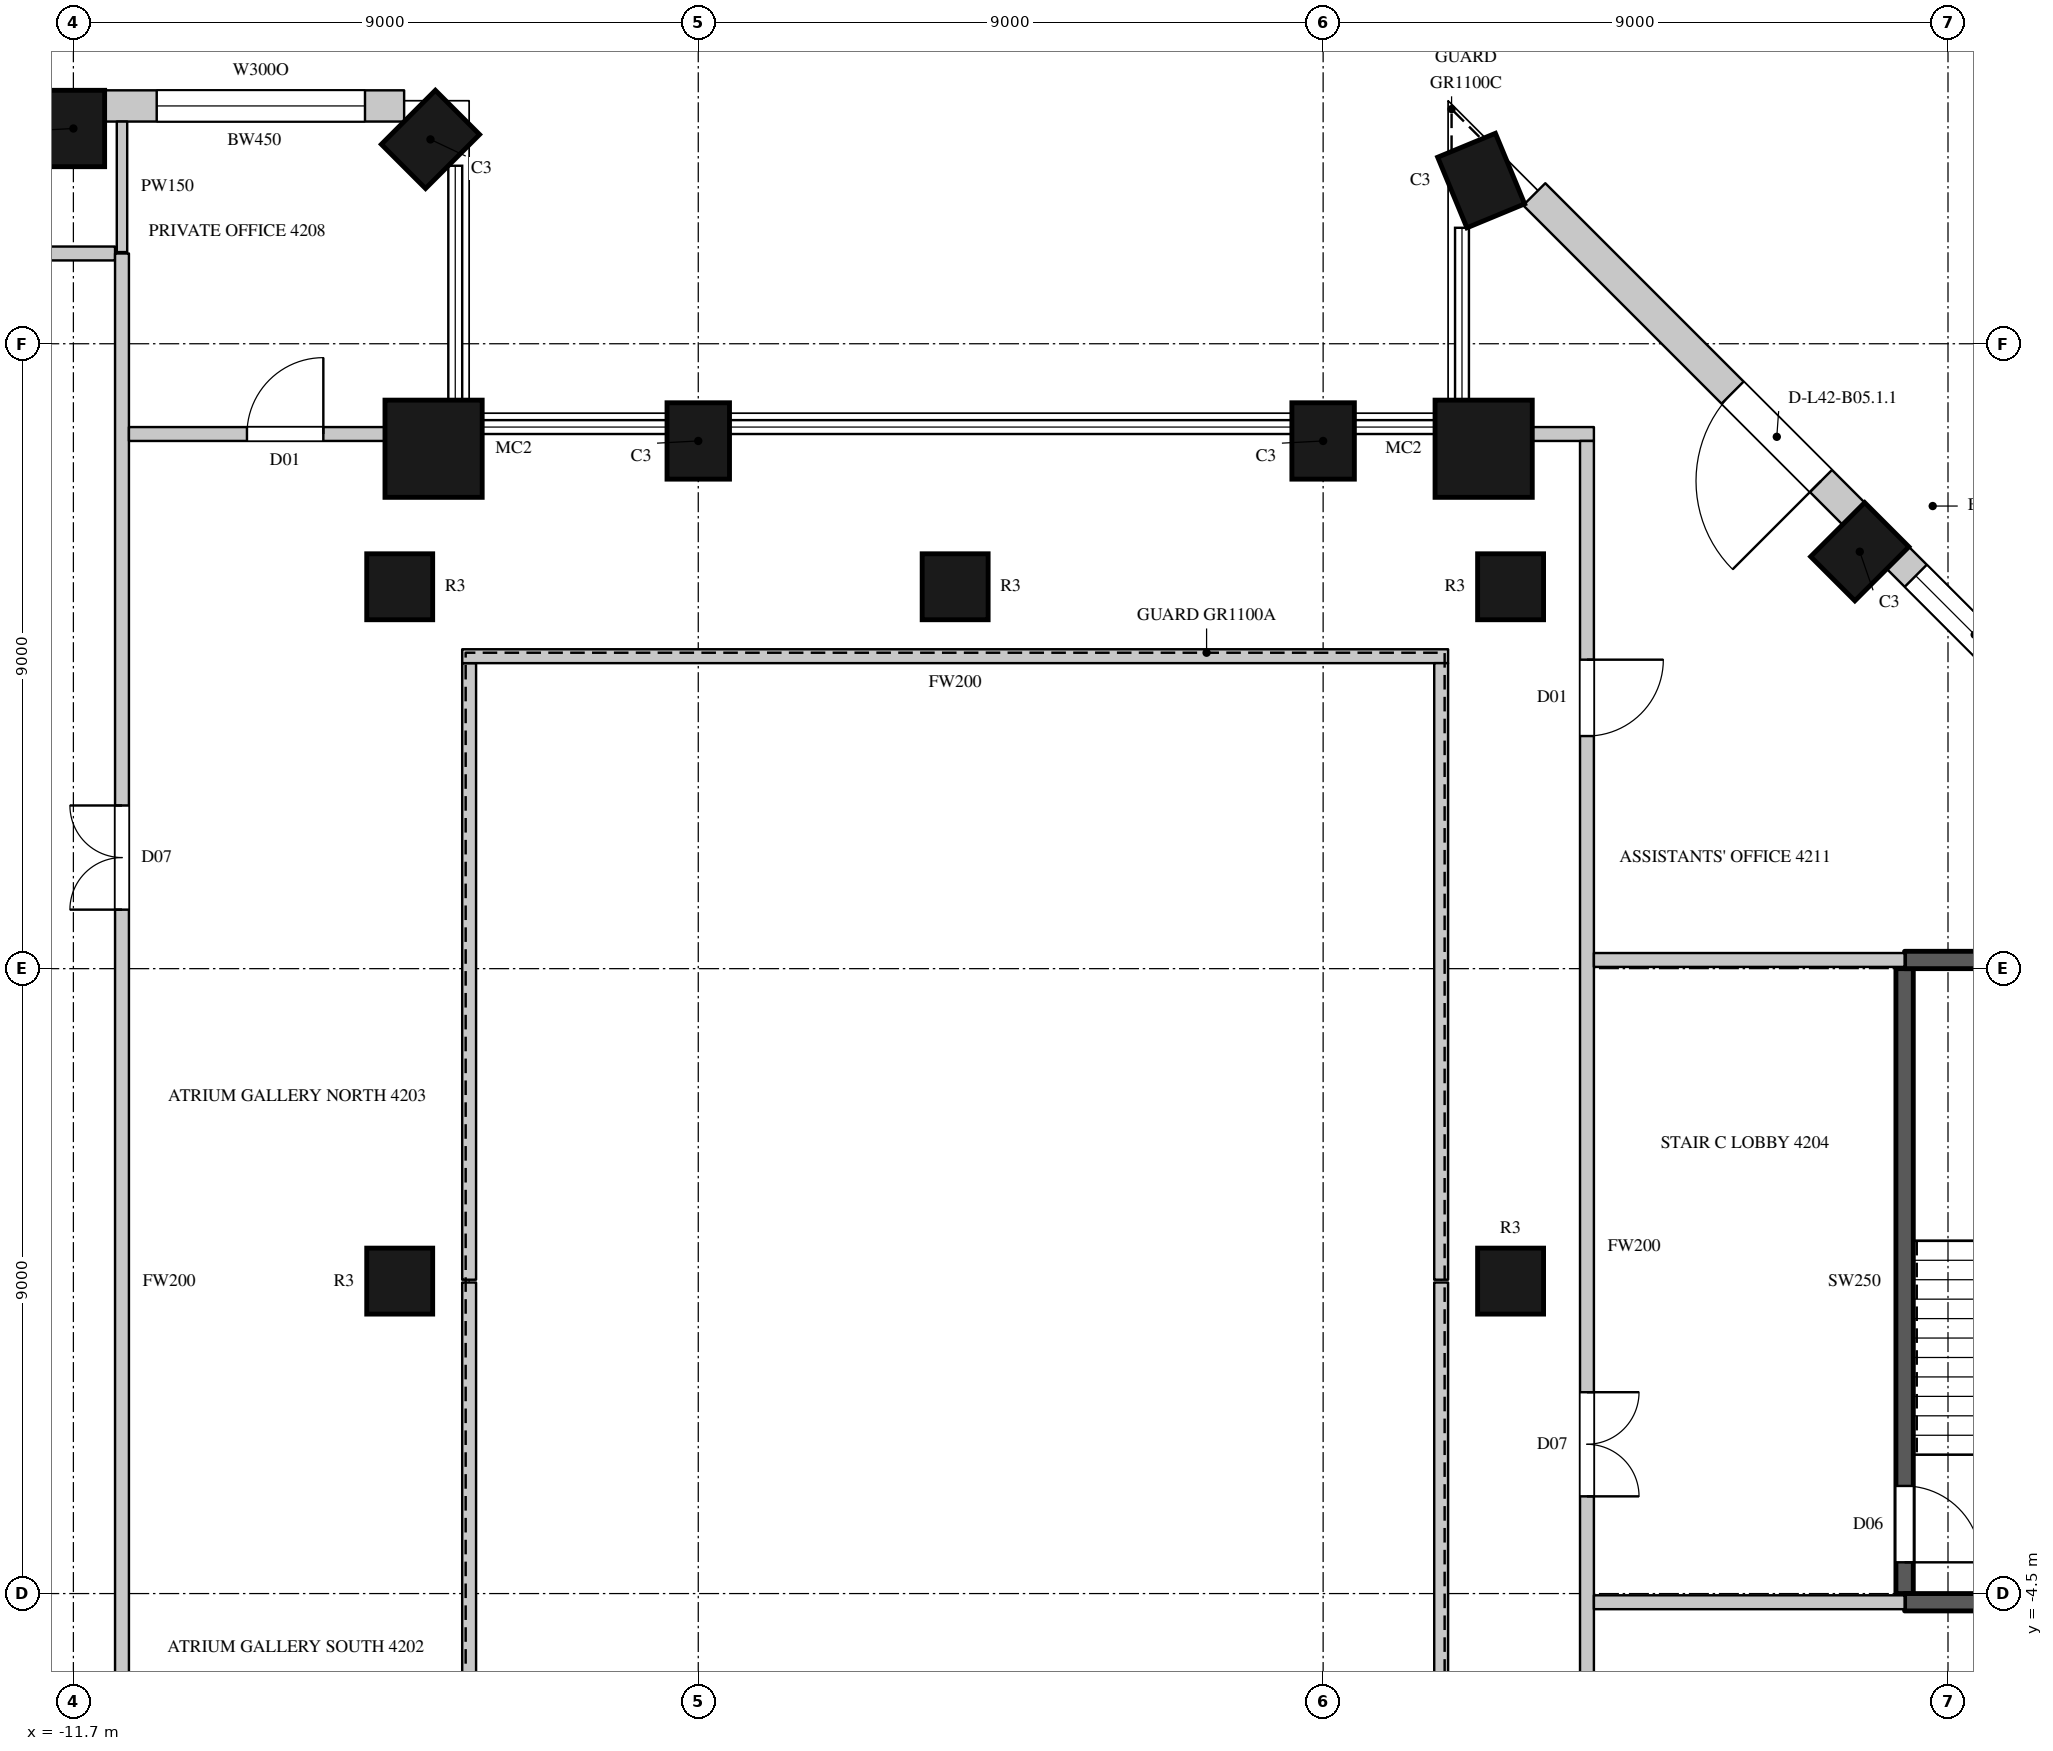
"""IFC4 building model, lengths in metres.
Left out: names, types, materials, properties, quantities, classifications, styles, units other than length and angle.
Written with IfcOpenShell. Run it as: python <this file> out.ifc"""

import sys

from ifc_helpers import new_model, si_unit, direction, frame, frame_2d, origin, origin_2d, place, context, subcontext, project, spatial, rectangle, circle, extrude, element, fill, save


model = new_model("IFC4")
c1 = context("Model", 3, precision=1e-05, world=origin(), true_north=direction((0.0, 1.0)))
c2 = subcontext(c1, "Body", "Model", "MODEL_VIEW")
j1 = project(units=[si_unit("LENGTHUNIT", "METRE"), si_unit("PLANEANGLEUNIT", "RADIAN")], contexts=[c1])
p1 = place(None, origin())
s1 = spatial("IfcSite", under=j1, at=p1, CompositionType="ELEMENT")
p2 = place(p1, origin())
s2 = spatial("IfcBuilding", under=s1, at=p2, CompositionType="ELEMENT")
p3 = place(p2, frame((0.0, 0.0, 193.3)))
s3 = spatial("IfcBuildingStorey", under=s2, at=p3, CompositionType="ELEMENT", Elevation=193.3)
for number, where, z_axis, x_axis in (
    (1, (14.029, 10.505, 0.0), (0.0, 0.0, 1.0), (-0.707, 0.707, 0.0)),
    (2, (8.576, 15.85, 0.0), (0.0, 0.0, 1.0), (-0.924, -0.383, 0.0)),
):
    element("IfcColumn", number, at=place(p3, frame(where, z_axis=z_axis, x_axis=x_axis)), inside=s3, PredefinedType="COLUMN", context=c2, shape_type="SweptSolid", body=[
        extrude(rectangle(XDim=0.9, YDim=1.1, at=origin_2d()), origin(), (0.0, 0.0, 1.0), 4.1),
    ])
p4 = place(p3, frame((8.612, 11.988, 0.0), z_axis=(0.0, 0.0, 1.0), x_axis=(1.0, 0.0, 0.0)))
e3 = element("IfcColumn", 3, at=p4, inside=s3, PredefinedType="COLUMN", context=c2, shape_type="SweptSolid", body=[
    extrude(circle(Radius=0.7, at=origin_2d()), origin(), (0.0, 0.0, 1.0), 4.1),
])
for number, where, z_axis, x_axis in (
    (4, (6.3, 12.1, 0.0), (0.0, 0.0, 1.0), (-1.0, 0.0, 0.0)),
    (5, (-2.7, 12.1, 0.0), (0.0, 0.0, 1.0), (-1.0, 0.0, 0.0)),
):
    element("IfcColumn", number, at=place(p3, frame(where, z_axis=z_axis, x_axis=x_axis)), inside=s3, PredefinedType="COLUMN", context=c2, shape_type="SweptSolid", body=[
        extrude(rectangle(XDim=0.9, YDim=1.1, at=origin_2d()), origin(), (0.0, 0.0, 1.0), 4.1),
    ])
p5 = place(p3, frame((-6.512, 11.988, 0.0), z_axis=(0.0, 0.0, 1.0), x_axis=(1.0, 0.0, 0.0)))
e6 = element("IfcColumn", 6, at=p5, inside=s3, PredefinedType="COLUMN", context=c2, shape_type="SweptSolid", body=[
    extrude(circle(Radius=0.7, at=origin_2d()), origin(), (0.0, 0.0, 1.0), 4.1),
])
for number, where, z_axis, x_axis in (
    (7, (-6.557, 16.443, 0.0), (0.0, 0.0, 1.0), (-0.707, 0.707, 0.0)),
    (8, (-11.7, 16.6, 0.0), (0.0, 0.0, 1.0), (-1.0, 0.0, 0.0)),
):
    element("IfcColumn", number, at=place(p3, frame(where, z_axis=z_axis, x_axis=x_axis)), inside=s3, PredefinedType="COLUMN", context=c2, shape_type="SweptSolid", body=[
        extrude(rectangle(XDim=0.9, YDim=1.1, at=origin_2d()), origin(), (0.0, 0.0, 1.0), 4.1),
    ])
for number, where, z_axis, x_axis in (
    (9, (-7.0, 0.0, 0.0), (0.0, 0.0, 1.0), (1.0, 0.0, 0.0)),
    (10, (-7.0, 10.0, 0.0), (0.0, 0.0, 1.0), (1.0, 0.0, 0.0)),
    (11, (1.0, 10.0, 0.0), (0.0, 0.0, 1.0), (1.0, 0.0, 0.0)),
    (12, (9.0, 0.0, 0.0), (0.0, 0.0, 1.0), (1.0, 0.0, 0.0)),
    (13, (9.0, 10.0, 0.0), (0.0, 0.0, 1.0), (1.0, 0.0, 0.0)),
):
    element("IfcColumn", number, at=place(p3, frame(where, z_axis=z_axis, x_axis=x_axis)), inside=s3, PredefinedType="COLUMN", context=c2, shape_type="SweptSolid", body=[
        extrude(circle(Radius=0.475, at=origin_2d()), origin(), (0.0, 0.0, 1.0), 4.1),
    ])
p6 = place(p3, frame((19.615, 5.379, 0.0), z_axis=(0.0, 0.0, 1.0), x_axis=(-0.707089646058, 0.7071239159, 0.0)))
e14 = element("IfcWall", 14, at=p6, inside=s3, PredefinedType="SOLIDWALL", context=c2, shape_type="SweptSolid", body=[
    extrude(rectangle(XDim=7.124, YDim=0.45, at=frame_2d((3.562, 0.0))), origin(), (0.0, 0.0, 1.0), 3.8),
])
p7 = place(p6, frame((0.328, 0.0, 1.05)))
e15 = element("IfcOpeningElement", 15, at=p7, cuts=e14, PredefinedType="OPENING", context=c2, shape_type="SweptSolid", body=[
    extrude(rectangle(XDim=2.4, YDim=2.4, at=frame_2d((1.2, 1.2))), frame((0.0, 0.235, 0.0), z_axis=(0.0, -1.0, 0.0), x_axis=(1.0, 0.0, 0.0)), (0.0, 0.0, 1.0), 0.47),
])
p8 = place(p6, frame((4.359, 0.0, 1.05)))
e16 = element("IfcOpeningElement", 16, at=p8, cuts=e14, PredefinedType="OPENING", context=c2, shape_type="SweptSolid", body=[
    extrude(rectangle(XDim=2.4, YDim=2.4, at=frame_2d((1.2, 1.2))), frame((0.0, 0.235, 0.0), z_axis=(0.0, -1.0, 0.0), x_axis=(1.0, 0.0, 0.0)), (0.0, 0.0, 1.0), 0.47),
])
p9 = place(p3, frame((13.941, 11.053, 0.0), z_axis=(0.0, 0.0, 1.0), x_axis=(-0.707106781187, 0.707106781187, 0.0)))
e17 = element("IfcWall", 17, at=p9, inside=s3, PredefinedType="SOLIDWALL", context=c2, shape_type="SweptSolid", body=[
    extrude(rectangle(XDim=6.505, YDim=0.45, at=frame_2d((3.252, 0.0))), origin(), (0.0, 0.0, 1.0), 3.8),
])
p10 = place(p9, frame((0.665, 0.0, 0.0)))
e18 = element("IfcOpeningElement", 18, at=p10, cuts=e17, PredefinedType="OPENING", context=c2, shape_type="SweptSolid", body=[
    extrude(rectangle(XDim=1.8, YDim=2.4, at=frame_2d((0.9, 1.2))), frame((0.0, 0.235, 0.0), z_axis=(0.0, -1.0, 0.0), x_axis=(1.0, 0.0, 0.0)), (0.0, 0.0, 1.0), 0.47),
])
p11 = place(p3, frame((-6.936, 16.925, 0.0), z_axis=(0.0, 0.0, 1.0), x_axis=(-1.0, 0.0, 0.0)))
e19 = element("IfcWall", 19, at=p11, inside=s3, PredefinedType="SOLIDWALL", context=c2, shape_type="SweptSolid", body=[
    extrude(rectangle(XDim=4.314, YDim=0.45, at=frame_2d((2.157, 0.0))), origin(), (0.0, 0.0, 1.0), 3.8),
])
p12 = place(p11, frame((0.564, 0.0, 1.05)))
e20 = element("IfcOpeningElement", 20, at=p12, cuts=e19, PredefinedType="OPENING", context=c2, shape_type="SweptSolid", body=[
    extrude(rectangle(XDim=3.0, YDim=2.4, at=frame_2d((1.5, 1.2))), frame((0.0, 0.235, 0.0), z_axis=(0.0, -1.0, 0.0), x_axis=(1.0, 0.0, 0.0)), (0.0, 0.0, 1.0), 0.47),
])
p13 = place(p3, frame((-13.97, 14.8, 0.0), z_axis=(0.0, 0.0, 1.0), x_axis=(1.0, 0.0, 0.0)))
e21 = element("IfcWall", 21, at=p13, inside=s3, PredefinedType="PARTITIONING", context=c2, shape_type="SweptSolid", body=[
    extrude(rectangle(XDim=2.87, YDim=0.2, at=frame_2d((1.435, 0.0))), origin(), (0.0, 0.0, 1.0), 3.8),
])
p14 = place(p3, frame((-11.0, -14.8, 0.0), z_axis=(0.0, 0.0, 1.0), x_axis=(0.0, 1.0, 0.0)))
e22 = element("IfcWall", 22, at=p14, inside=s3, PredefinedType="PARTITIONING", context=c2, shape_type="SweptSolid", body=[
    extrude(rectangle(XDim=29.6, YDim=0.2, at=frame_2d((14.8, 0.0))), origin(), (0.0, 0.0, 1.0), 3.8),
])
p15 = place(p14, frame((20.15, 0.0, 0.0)))
e23 = element("IfcOpeningElement", 23, at=p15, cuts=e22, PredefinedType="OPENING", context=c2, shape_type="SweptSolid", body=[
    extrude(rectangle(XDim=1.5, YDim=2.4, at=frame_2d((0.75, 1.2))), frame((0.0, 0.11, 0.0), z_axis=(0.0, -1.0, 0.0), x_axis=(1.0, 0.0, 0.0)), (0.0, 0.0, 1.0), 0.22),
])
p16 = place(p3, frame((-10.9, 12.2, 0.0), z_axis=(0.0, 0.0, 1.0), x_axis=(1.0, 0.0, 0.0)))
e24 = element("IfcWall", 24, at=p16, inside=s3, PredefinedType="PARTITIONING", context=c2, shape_type="SweptSolid", body=[
    extrude(rectangle(XDim=3.704, YDim=0.2, at=frame_2d((1.852, 0.0))), origin(), (0.0, 0.0, 1.0), 3.8),
])
p17 = place(p16, frame((1.7, 0.0, 0.0)))
e25 = element("IfcOpeningElement", 25, at=p17, cuts=e24, PredefinedType="OPENING", context=c2, shape_type="SweptSolid", body=[
    extrude(rectangle(XDim=1.1, YDim=2.4, at=frame_2d((0.55, 1.2))), frame((0.0, 0.11, 0.0), z_axis=(0.0, -1.0, 0.0), x_axis=(1.0, 0.0, 0.0)), (0.0, 0.0, 1.0), 0.22),
])
for number, where, z_axis, x_axis in (
    (26, (-6.0, -8.9, 0.0), (0.0, 0.0, 1.0), (0.0, 1.0, 0.0)),
    (27, (-6.0, 0.02, 0.0), (0.0, 0.0, 1.0), (0.0, 1.0, 0.0)),
):
    element("IfcWall", number, at=place(p3, frame(where, z_axis=z_axis, x_axis=x_axis)), inside=s3, PredefinedType="PARTITIONING", context=c2, shape_type="SweptSolid", body=[
        extrude(rectangle(XDim=8.88, YDim=0.2, at=frame_2d((4.44, 0.0))), origin(), (0.0, 0.0, 1.0), 3.8),
    ])
p18 = place(p3, frame((-6.1, 9.0, 0.0), z_axis=(0.0, 0.0, 1.0), x_axis=(1.0, 0.0, 0.0)))
e28 = element("IfcWall", 28, at=p18, inside=s3, PredefinedType="PARTITIONING", context=c2, shape_type="SweptSolid", body=[
    extrude(rectangle(XDim=14.2, YDim=0.2, at=frame_2d((7.1, 0.0))), origin(), (0.0, 0.0, 1.0), 3.8),
])
for number, where, z_axis, x_axis in (
    (29, (8.0, -8.9, 0.0), (0.0, 0.0, 1.0), (0.0, 1.0, 0.0)),
    (30, (8.0, 0.02, 0.0), (0.0, 0.0, 1.0), (0.0, 1.0, 0.0)),
):
    element("IfcWall", number, at=place(p3, frame(where, z_axis=z_axis, x_axis=x_axis)), inside=s3, PredefinedType="PARTITIONING", context=c2, shape_type="SweptSolid", body=[
        extrude(rectangle(XDim=8.88, YDim=0.2, at=frame_2d((4.44, 0.0))), origin(), (0.0, 0.0, 1.0), 3.8),
    ])
p19 = place(p3, frame((9.296, 12.2, 0.0), z_axis=(0.0, 0.0, 1.0), x_axis=(1.0, 0.0, 0.0)))
e31 = element("IfcWall", 31, at=p19, inside=s3, PredefinedType="PARTITIONING", context=c2, shape_type="SweptSolid", body=[
    extrude(rectangle(XDim=0.904, YDim=0.2, at=frame_2d((0.452, 0.0))), origin(), (0.0, 0.0, 1.0), 3.8),
])
p20 = place(p3, frame((10.1, -11.1, 0.0), z_axis=(0.0, 0.0, 1.0), x_axis=(0.0, 1.0, 0.0)))
e32 = element("IfcWall", 32, at=p20, inside=s3, PredefinedType="PARTITIONING", context=c2, shape_type="SweptSolid", body=[
    extrude(rectangle(XDim=23.2, YDim=0.2, at=frame_2d((11.6, 0.0))), origin(), (0.0, 0.0, 1.0), 3.8),
])
p21 = place(p20, frame((8.0, 0.0, 0.0)))
e33 = element("IfcOpeningElement", 33, at=p21, cuts=e32, PredefinedType="OPENING", context=c2, shape_type="SweptSolid", body=[
    extrude(rectangle(XDim=1.5, YDim=2.4, at=frame_2d((0.75, 1.2))), frame((0.0, 0.11, 0.0), z_axis=(0.0, -1.0, 0.0), x_axis=(1.0, 0.0, 0.0)), (0.0, 0.0, 1.0), 0.22),
])
p22 = place(p20, frame((18.95, 0.0, 0.0)))
e34 = element("IfcOpeningElement", 34, at=p22, cuts=e32, PredefinedType="OPENING", context=c2, shape_type="SweptSolid", body=[
    extrude(rectangle(XDim=1.1, YDim=2.4, at=frame_2d((0.55, 1.2))), frame((0.0, 0.11, 0.0), z_axis=(0.0, -1.0, 0.0), x_axis=(1.0, 0.0, 0.0)), (0.0, 0.0, 1.0), 0.22),
])
p23 = place(p20, frame((2.7, 0.0, 0.0)))
e35 = element("IfcOpeningElement", 35, at=p23, cuts=e32, PredefinedType="OPENING", context=c2, shape_type="SweptSolid", body=[
    extrude(rectangle(XDim=1.1, YDim=2.4, at=frame_2d((0.55, 1.2))), frame((0.0, 0.11, 0.0), z_axis=(0.0, -1.0, 0.0), x_axis=(1.0, 0.0, 0.0)), (0.0, 0.0, 1.0), 0.22),
])
for number, where, z_axis, x_axis in (
    (36, (10.2, -4.625, 0.0), (0.0, 0.0, 1.0), (1.0, 0.0, 0.0)),
    (37, (10.2, 4.625, 0.0), (0.0, 0.0, 1.0), (1.0, 0.0, 0.0)),
):
    element("IfcWall", number, at=place(p3, frame(where, z_axis=z_axis, x_axis=x_axis)), inside=s3, PredefinedType="PARTITIONING", context=c2, shape_type="SweptSolid", body=[
        extrude(rectangle(XDim=4.475, YDim=0.2, at=frame_2d((2.238, 0.0))), origin(), (0.0, 0.0, 1.0), 3.8),
    ])
p24 = place(p3, frame((-11.0, 14.82, 0.0), z_axis=(0.0, 0.0, 1.0), x_axis=(0.0, 1.0, 0.0)))
e38 = element("IfcWall", 38, at=p24, inside=s3, PredefinedType="PARTITIONING", context=c2, shape_type="SweptSolid", body=[
    extrude(rectangle(XDim=1.88, YDim=0.15, at=frame_2d((0.94, 0.0))), origin(), (0.0, 0.0, 1.0), 3.8),
])
p25 = place(p3, frame((14.675, -4.5, 0.0), z_axis=(0.0, 0.0, 1.0), x_axis=(0.0, 1.0, 0.0)))
e39 = element("IfcWall", 39, at=p25, inside=s3, PredefinedType="SHEAR", context=c2, shape_type="SweptSolid", body=[
    extrude(rectangle(XDim=9.0, YDim=0.25, at=frame_2d((4.5, 0.0))), origin(), (0.0, 0.0, 1.0), 3.8),
])
p26 = place(p25, frame((0.45, 0.0, 0.0)))
e40 = element("IfcOpeningElement", 40, at=p26, cuts=e39, PredefinedType="OPENING", context=c2, shape_type="SweptSolid", body=[
    extrude(rectangle(XDim=1.1, YDim=2.2, at=frame_2d((0.55, 1.1))), frame((0.0, 0.135, 0.0), z_axis=(0.0, -1.0, 0.0), x_axis=(1.0, 0.0, 0.0)), (0.0, 0.0, 1.0), 0.27),
])
p27 = place(p3, frame((14.675, -4.625, 0.0), z_axis=(0.0, 0.0, 1.0), x_axis=(1.0, 0.0, 0.0)))
e41 = element("IfcWall", 41, at=p27, inside=s3, PredefinedType="SHEAR", context=c2, shape_type="SweptSolid", body=[
    extrude(rectangle(XDim=4.45, YDim=0.25, at=frame_2d((2.225, 0.0))), origin(), (0.0, 0.0, 1.0), 3.8),
])
p28 = place(p3, frame((14.675, 4.625, 0.0), z_axis=(0.0, 0.0, 1.0), x_axis=(1.0, 0.0, 0.0)))
e42 = element("IfcWall", 42, at=p28, inside=s3, PredefinedType="SHEAR", context=c2, shape_type="SweptSolid", body=[
    extrude(rectangle(XDim=4.324, YDim=0.25, at=frame_2d((2.162, 0.0))), origin(), (0.0, 0.0, 1.0), 3.8),
])
p29 = place(p8, origin())
e43 = element("IfcWindow", 43, at=p29, inside=s3, PartitioningType="SINGLE_PANEL", PredefinedType="WINDOW", context=c2, shape_type="SweptSolid", body=[
    extrude(rectangle(XDim=2.4, YDim=2.4, at=frame_2d((1.2, 1.2))), frame((0.0, 0.135, 0.0), z_axis=(0.0, -1.0, 0.0), x_axis=(1.0, 0.0, 0.0)), (0.0, 0.0, 1.0), 0.06),
])
fill(e16, e43)
p30 = place(p10, origin())
e44 = element("IfcDoor", 44, at=p30, inside=s3, OperationType="SLIDING_TO_LEFT", PredefinedType="DOOR", context=c2, shape_type="SweptSolid", body=[
    extrude(rectangle(XDim=1.8, YDim=2.4, at=frame_2d((0.9, 1.2))), frame((0.0, 0.13, 0.0), z_axis=(0.0, -1.0, 0.0), x_axis=(1.0, 0.0, 0.0)), (0.0, 0.0, 1.0), 0.05),
])
fill(e18, e44)
p31 = place(p12, origin())
e45 = element("IfcWindow", 45, at=p31, inside=s3, PartitioningType="SINGLE_PANEL", PredefinedType="WINDOW", context=c2, shape_type="SweptSolid", body=[
    extrude(rectangle(XDim=3.0, YDim=2.4, at=frame_2d((1.5, 1.2))), frame((0.0, 0.135, 0.0), z_axis=(0.0, -1.0, 0.0), x_axis=(1.0, 0.0, 0.0)), (0.0, 0.0, 1.0), 0.06),
])
fill(e20, e45)
p32 = place(p15, origin())
e46 = element("IfcDoor", 46, at=p32, inside=s3, OperationType="DOUBLE_DOOR_SINGLE_SWING", PredefinedType="DOOR", context=c2, shape_type="SweptSolid", body=[
    extrude(rectangle(XDim=1.5, YDim=2.4, at=frame_2d((0.75, 1.2))), frame((0.0, 0.025, 0.0), z_axis=(0.0, -1.0, 0.0), x_axis=(1.0, 0.0, 0.0)), (0.0, 0.0, 1.0), 0.05),
])
fill(e23, e46)
p33 = place(p21, origin())
e47 = element("IfcDoor", 47, at=p33, inside=s3, OperationType="DOUBLE_DOOR_SINGLE_SWING", PredefinedType="DOOR", context=c2, shape_type="SweptSolid", body=[
    extrude(rectangle(XDim=1.5, YDim=2.4, at=frame_2d((0.75, 1.2))), frame((0.0, 0.025, 0.0), z_axis=(0.0, -1.0, 0.0), x_axis=(1.0, 0.0, 0.0)), (0.0, 0.0, 1.0), 0.05),
])
fill(e33, e47)
p34 = place(p17, origin())
e48 = element("IfcDoor", 48, at=p34, inside=s3, OperationType="SINGLE_SWING_RIGHT", PredefinedType="DOOR", context=c2, shape_type="SweptSolid", body=[
    extrude(rectangle(XDim=1.1, YDim=2.4, at=frame_2d((0.55, 1.2))), frame((0.0, 0.025, 0.0), z_axis=(0.0, -1.0, 0.0), x_axis=(1.0, 0.0, 0.0)), (0.0, 0.0, 1.0), 0.05),
])
fill(e25, e48)
p35 = place(p22, origin())
e49 = element("IfcDoor", 49, at=p35, inside=s3, OperationType="SINGLE_SWING_LEFT", PredefinedType="DOOR", context=c2, shape_type="SweptSolid", body=[
    extrude(rectangle(XDim=1.1, YDim=2.4, at=frame_2d((0.55, 1.2))), frame((0.0, 0.025, 0.0), z_axis=(0.0, -1.0, 0.0), x_axis=(1.0, 0.0, 0.0)), (0.0, 0.0, 1.0), 0.05),
])
fill(e34, e49)
p36 = place(p26, origin())
e50 = element("IfcDoor", 50, at=p36, inside=s3, OperationType="SINGLE_SWING_RIGHT", PredefinedType="DOOR", context=c2, shape_type="SweptSolid", body=[
    extrude(rectangle(XDim=1.1, YDim=2.2, at=frame_2d((0.55, 1.1))), frame((0.0, 0.025, 0.0), z_axis=(0.0, -1.0, 0.0), x_axis=(1.0, 0.0, 0.0)), (0.0, 0.0, 1.0), 0.05),
])
fill(e40, e50)
save(model, sys.argv[1])
